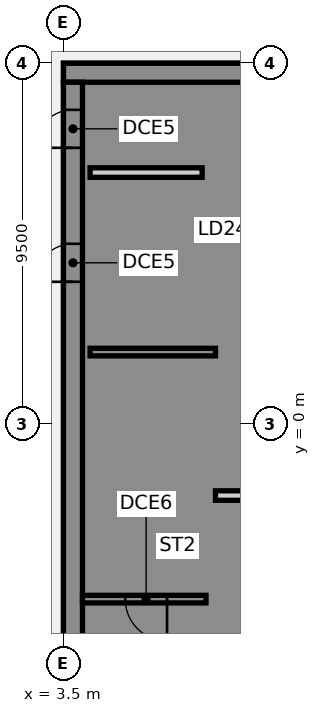
"""IFC4 building model, lengths in metres.
Left out: names, types, materials, properties, quantities, classifications, styles, units other than length and angle.
Written with IfcOpenShell. Run it as: python <this file> out.ifc"""

import sys

from ifc_helpers import new_model, si_unit, direction, frame, frame_2d, origin, place, context, subcontext, project, spatial, polyline, rectangle, outline, extrude, element, fill, save


model = new_model("IFC4")
c1 = context("Model", 3, precision=1e-05, world=origin(), true_north=direction((0.0, 1.0)))
c2 = subcontext(c1, "Body", "Model", "MODEL_VIEW")
j1 = project(units=[si_unit("LENGTHUNIT", "METRE"), si_unit("PLANEANGLEUNIT", "RADIAN")], contexts=[c1])
p1 = place(None, origin())
s1 = spatial("IfcSite", under=j1, at=p1, CompositionType="ELEMENT")
p2 = place(p1, origin())
s2 = spatial("IfcBuilding", under=s1, at=p2, CompositionType="ELEMENT")
p3 = place(p2, frame((0.0, 0.0, 267.6)))
s3 = spatial("IfcBuildingStorey", under=s2, at=p3, CompositionType="ELEMENT", Elevation=267.6)
p4 = place(p3, frame((16.5, 9.25, 0.0), z_axis=(0.0, 0.0, 1.0), x_axis=(-1.0, 0.0, 0.0)))
e1 = element("IfcWall", 1, at=p4, inside=s3, PredefinedType="SHEAR", context=c2, shape_type="SweptSolid", body=[
    extrude(rectangle(XDim=13.0, YDim=0.5, at=frame_2d((6.5, 0.0))), origin(), (0.0, 0.0, 1.0), 3.46),
])
p5 = place(p3, origin())
e2 = element("IfcWall", 2, at=p5, inside=s3, PredefinedType="SHEAR", context=c2, shape_type="SweptSolid", body=[
    extrude(outline(polyline([(9.8, -5.375), (7.5, -5.375), (7.5, 2.625), (9.8, 2.625), (9.8, 2.875), (7.5, 2.875), (7.5, 5.375), (9.8, 5.375), (9.8, 5.625), (7.5, 5.625), (7.5, 8.125), (9.8, 8.125), (9.8, 9.0), (7.5, 9.0), (7.25, 9.0), (7.25, -5.625), (7.5, -5.625), (9.8, -5.625), (9.8, -5.375)])), origin(), (0.0, 0.0, 1.0), 3.46),
])
p6 = place(p3, frame((7.5, 1.9, 0.0), z_axis=(0.0, 0.0, 1.0), x_axis=(-1.0, 0.0, 0.0)))
e3 = element("IfcWall", 3, at=p6, inside=s3, PredefinedType="SHEAR", context=c2, shape_type="SweptSolid", body=[
    extrude(rectangle(XDim=3.3, YDim=0.2, at=frame_2d((1.65, 0.0))), origin(), (0.0, 0.0, 1.0), 3.46),
])
p7 = place(p3, frame((3.75, -9.0, 0.0), z_axis=(0.0, 0.0, 1.0), x_axis=(0.0, 1.0, 0.0)))
e4 = element("IfcWall", 4, at=p7, inside=s3, PredefinedType="SHEAR", context=c2, shape_type="SweptSolid", body=[
    extrude(rectangle(XDim=18.0, YDim=0.5, at=frame_2d((9.0, 0.0))), origin(), (0.0, 0.0, 1.0), 3.46),
])
p8 = place(p7, frame((1.35, 0.0, 0.0)))
e5 = element("IfcOpeningElement", 5, at=p8, cuts=e4, PredefinedType="OPENING", context=c2, shape_type="SweptSolid", body=[
    extrude(rectangle(XDim=1.8, YDim=2.1, at=frame_2d((0.9, 1.05))), frame((0.0, 0.26, 0.0), z_axis=(0.0, -1.0, 0.0), x_axis=(1.0, 0.0, 0.0)), (0.0, 0.0, 1.0), 0.52),
])
p9 = place(p7, frame((12.75, 0.0, 0.0)))
e6 = element("IfcOpeningElement", 6, at=p9, cuts=e4, PredefinedType="OPENING", context=c2, shape_type="SweptSolid", body=[
    extrude(rectangle(XDim=1.0, YDim=2.1, at=frame_2d((0.5, 1.05))), frame((0.0, 0.26, 0.0), z_axis=(0.0, -1.0, 0.0), x_axis=(1.0, 0.0, 0.0)), (0.0, 0.0, 1.0), 0.52),
])
p10 = place(p7, frame((16.274, 0.0, 0.0)))
e7 = element("IfcOpeningElement", 7, at=p10, cuts=e4, PredefinedType="OPENING", context=c2, shape_type="SweptSolid", body=[
    extrude(rectangle(XDim=1.0, YDim=2.1, at=frame_2d((0.5, 1.05))), frame((0.0, 0.26, 0.0), z_axis=(0.0, -1.0, 0.0), x_axis=(1.0, 0.0, 0.0)), (0.0, 0.0, 1.0), 0.52),
])
p11 = place(p3, frame((7.15, 6.624, 0.0), z_axis=(0.0, 0.0, 1.0), x_axis=(-1.0, 0.0, 0.0)))
e8 = element("IfcWall", 8, at=p11, inside=s3, PredefinedType="PARTITIONING", context=c2, shape_type="SweptSolid", body=[
    extrude(rectangle(XDim=2.95, YDim=0.25, at=frame_2d((1.475, 0.0))), origin(), (0.0, 0.0, 1.0), 3.46),
])
p12 = place(p3, frame((7.25, -4.6, 0.0), z_axis=(0.0, 0.0, 1.0), x_axis=(-1.0, 0.0, 0.0)))
e9 = element("IfcWall", 9, at=p12, inside=s3, PredefinedType="SHEAR", context=c2, shape_type="SweptSolid", body=[
    extrude(rectangle(XDim=3.25, YDim=0.2, at=frame_2d((1.625, 0.0))), origin(), (0.0, 0.0, 1.0), 3.46),
])
p13 = place(p12, frame((1.025, 0.0, 0.0)))
e10 = element("IfcOpeningElement", 10, at=p13, cuts=e9, PredefinedType="OPENING", context=c2, shape_type="SweptSolid", body=[
    extrude(rectangle(XDim=1.1, YDim=2.1, at=frame_2d((0.55, 1.05))), frame((0.0, 0.11, 0.0), z_axis=(0.0, -1.0, 0.0), x_axis=(1.0, 0.0, 0.0)), (0.0, 0.0, 1.0), 0.22),
])
p14 = place(p3, frame((9.8, -1.875, 0.0), z_axis=(0.0, 0.0, 1.0), x_axis=(-1.0, 0.0, 0.0)))
e11 = element("IfcWall", 11, at=p14, inside=s3, PredefinedType="PARTITIONING", context=c2, shape_type="SweptSolid", body=[
    extrude(rectangle(XDim=2.3, YDim=0.25, at=frame_2d((1.15, 0.0))), origin(), (0.0, 0.0, 1.0), 3.46),
])
p15 = place(p9, origin())
e12 = element("IfcDoor", 12, at=p15, inside=s3, OperationType="SINGLE_SWING_LEFT", PredefinedType="DOOR", context=c2, shape_type="SweptSolid", body=[
    extrude(rectangle(XDim=1.0, YDim=2.1, at=frame_2d((0.5, 1.05))), frame((0.0, -0.175, 0.0), z_axis=(0.0, -1.0, 0.0), x_axis=(1.0, 0.0, 0.0)), (0.0, 0.0, 1.0), 0.05),
])
fill(e6, e12)
p16 = place(p10, origin())
e13 = element("IfcDoor", 13, at=p16, inside=s3, OperationType="SINGLE_SWING_LEFT", PredefinedType="DOOR", context=c2, shape_type="SweptSolid", body=[
    extrude(rectangle(XDim=1.0, YDim=2.1, at=frame_2d((0.5, 1.05))), frame((0.0, -0.175, 0.0), z_axis=(0.0, -1.0, 0.0), x_axis=(1.0, 0.0, 0.0)), (0.0, 0.0, 1.0), 0.05),
])
fill(e7, e13)
p17 = place(p13, origin())
e14 = element("IfcDoor", 14, at=p17, inside=s3, OperationType="SINGLE_SWING_LEFT", PredefinedType="DOOR", context=c2, shape_type="SweptSolid", body=[
    extrude(rectangle(XDim=1.1, YDim=2.1, at=frame_2d((0.55, 1.05))), frame((0.0, 0.025, 0.0), z_axis=(0.0, -1.0, 0.0), x_axis=(1.0, 0.0, 0.0)), (0.0, 0.0, 1.0), 0.05),
])
fill(e10, e14)
save(model, sys.argv[1])
